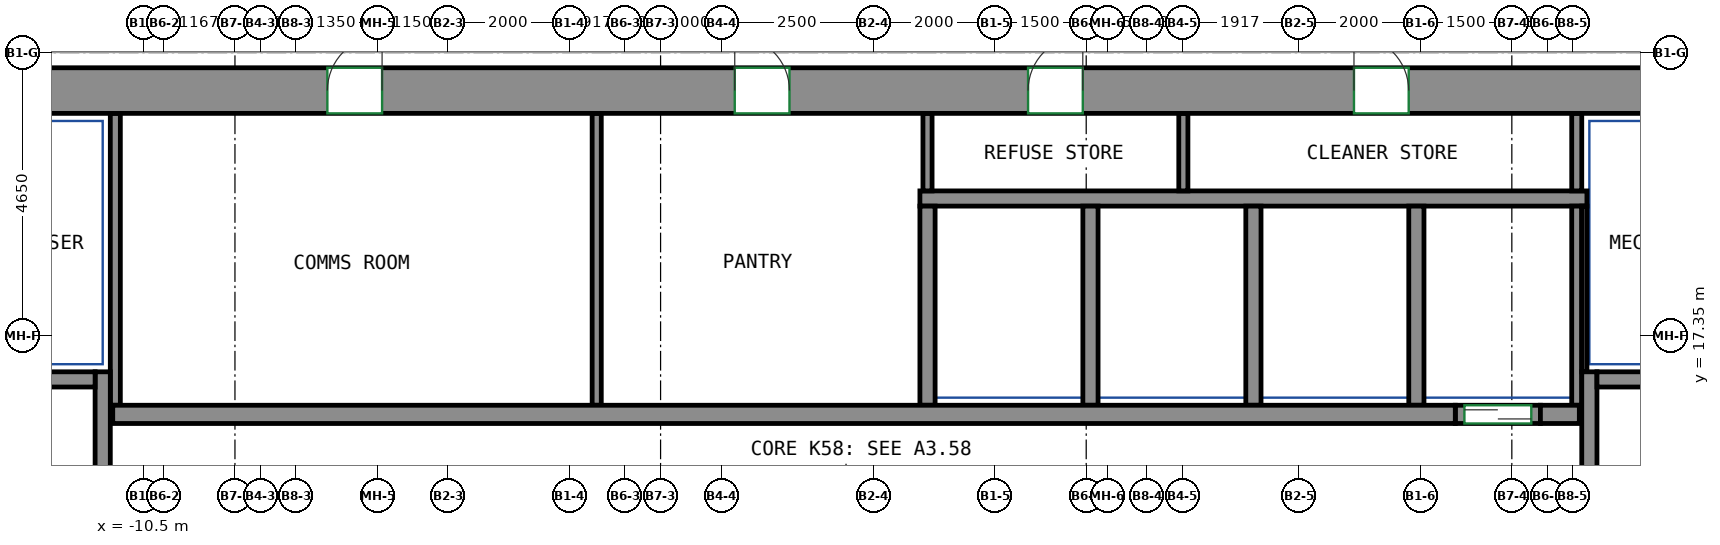
"""IFC4 building model, lengths in metres.
Left out: names, types, materials, properties, quantities, classifications, styles, units other than length and angle.
Written with IfcOpenShell. Run it as: python <this file> out.ifc"""

import sys

from ifc_helpers import new_model, si_unit, direction, frame, frame_2d, origin, place, context, subcontext, project, spatial, rectangle, extrude, source, transform, mapped, element, fill, save


model = new_model("IFC4")
c1 = context("Model", 3, precision=1e-05, world=origin(), true_north=direction((0.0, 1.0)))
c2 = subcontext(c1, "Body", "Model", "MODEL_VIEW")
j1 = project(units=[si_unit("LENGTHUNIT", "METRE"), si_unit("PLANEANGLEUNIT", "RADIAN")], contexts=[c1])
p1 = place(None, origin())
s1 = spatial("IfcSite", under=j1, at=p1, CompositionType="ELEMENT")
p2 = place(p1, origin())
s2 = spatial("IfcBuilding", under=s1, at=p2, CompositionType="ELEMENT")
p3 = place(p2, frame((0.0, 0.0, 239.0)))
s3 = spatial("IfcBuildingStorey", under=s2, at=p3, CompositionType="ELEMENT", Elevation=239.0)
m1 = source(origin(), c2, "Body", "SweptSolid", [
    extrude(rectangle(XDim=33.6, YDim=0.75, at=frame_2d((16.8, 0.0))), origin(), (0.0, 0.0, 1.0), 3.12),
])
p4 = place(p3, frame((-15.75, 21.375, 0.0), z_axis=(0.0, 0.0, 1.0), x_axis=(1.0, 0.0, 0.0)))
e1 = element("IfcWall", 1, at=p4, inside=s3, PredefinedType="SHEAR", context=c2, shape_type="MappedRepresentation", body=[
    mapped(m1, transform((0.0, 0.0, 0.0))),
])
p5 = place(p4, frame((8.27, 0.0, 0.0)))
e2 = element("IfcOpeningElement", 2, at=p5, cuts=e1, PredefinedType="OPENING", context=c2, shape_type="SweptSolid", body=[
    extrude(rectangle(XDim=0.9, YDim=2.1, at=frame_2d((0.45, 1.05))), frame((0.0, 0.385, 0.0), z_axis=(0.0, -1.0, 0.0), x_axis=(1.0, 0.0, 0.0)), (0.0, 0.0, 1.0), 0.77),
])
p6 = place(p4, frame((14.97, 0.0, 0.0)))
e3 = element("IfcOpeningElement", 3, at=p6, cuts=e1, PredefinedType="OPENING", context=c2, shape_type="SweptSolid", body=[
    extrude(rectangle(XDim=0.9, YDim=2.1, at=frame_2d((0.45, 1.05))), frame((0.0, 0.385, 0.0), z_axis=(0.0, -1.0, 0.0), x_axis=(1.0, 0.0, 0.0)), (0.0, 0.0, 1.0), 0.77),
])
p7 = place(p4, frame((19.794, 0.0, 0.0)))
e4 = element("IfcOpeningElement", 4, at=p7, cuts=e1, PredefinedType="OPENING", context=c2, shape_type="SweptSolid", body=[
    extrude(rectangle(XDim=0.9, YDim=2.1, at=frame_2d((0.45, 1.05))), frame((0.0, 0.385, 0.0), z_axis=(0.0, -1.0, 0.0), x_axis=(1.0, 0.0, 0.0)), (0.0, 0.0, 1.0), 0.77),
])
p8 = place(p4, frame((25.154, 0.0, 0.0)))
e5 = element("IfcOpeningElement", 5, at=p8, cuts=e1, PredefinedType="OPENING", context=c2, shape_type="SweptSolid", body=[
    extrude(rectangle(XDim=0.9, YDim=2.1, at=frame_2d((0.45, 1.05))), frame((0.0, 0.385, 0.0), z_axis=(0.0, -1.0, 0.0), x_axis=(1.0, 0.0, 0.0)), (0.0, 0.0, 1.0), 0.77),
])
p9 = place(p4, frame((2.275, 0.0, 0.0)))
e6 = element("IfcOpeningElement", 6, at=p9, cuts=e1, PredefinedType="OPENING", context=c2, shape_type="SweptSolid", body=[
    extrude(rectangle(XDim=0.9, YDim=2.1, at=frame_2d((0.45, 1.05))), frame((0.0, 0.385, 0.0), z_axis=(0.0, -1.0, 0.0), x_axis=(1.0, 0.0, 0.0)), (0.0, 0.0, 1.0), 0.77),
])
p10 = place(p4, frame((30.425, 0.0, 0.0)))
e7 = element("IfcOpeningElement", 7, at=p10, cuts=e1, PredefinedType="OPENING", context=c2, shape_type="SweptSolid", body=[
    extrude(rectangle(XDim=0.9, YDim=2.1, at=frame_2d((0.45, 1.05))), frame((0.0, 0.385, 0.0), z_axis=(0.0, -1.0, 0.0), x_axis=(1.0, 0.0, 0.0)), (0.0, 0.0, 1.0), 0.77),
])
m2 = source(origin(), c2, "Body", "SweptSolid", [
    extrude(rectangle(XDim=7.75, YDim=0.25, at=frame_2d((3.875, 0.0))), origin(), (0.0, 0.0, 1.0), 3.12),
])
p11 = place(p3, frame((-11.175, 9.0, 0.0), z_axis=(0.0, 0.0, 1.0), x_axis=(0.0, 1.0, 0.0)))
e8 = element("IfcWall", 8, at=p11, inside=s3, PredefinedType="SHEAR", context=c2, shape_type="MappedRepresentation", body=[
    mapped(m2, transform((0.0, 0.0, 0.0))),
])
m3 = source(origin(), c2, "Body", "SweptSolid", [
    extrude(rectangle(XDim=3.7, YDim=0.25, at=frame_2d((1.85, 0.0))), origin(), (0.0, 0.0, 1.0), 3.12),
])
p12 = place(p3, frame((-15.0, 16.625, 0.0), z_axis=(0.0, 0.0, 1.0), x_axis=(1.0, 0.0, 0.0)))
e9 = element("IfcWall", 9, at=p12, inside=s3, PredefinedType="SHEAR", context=c2, shape_type="MappedRepresentation", body=[
    mapped(m3, transform((0.0, 0.0, 0.0))),
])
p13 = place(p3, frame((13.275, 9.0, 0.0), z_axis=(0.0, 0.0, 1.0), x_axis=(0.0, 1.0, 0.0)))
e10 = element("IfcWall", 10, at=p13, inside=s3, PredefinedType="SHEAR", context=c2, shape_type="MappedRepresentation", body=[
    mapped(m2, transform((0.0, 0.0, 0.0))),
])
m4 = source(origin(), c2, "Body", "SweptSolid", [
    extrude(rectangle(XDim=3.7, YDim=0.25, at=frame_2d((1.85, 0.0))), origin(), (0.0, 0.0, 1.0), 3.12),
])
p14 = place(p3, frame((13.4, 16.625, 0.0), z_axis=(0.0, 0.0, 1.0), x_axis=(1.0, 0.0, 0.0)))
e11 = element("IfcWall", 11, at=p14, inside=s3, PredefinedType="SHEAR", context=c2, shape_type="MappedRepresentation", body=[
    mapped(m4, transform((0.0, 0.0, 0.0))),
])
m5 = source(origin(), c2, "Body", "SweptSolid", [
    extrude(rectangle(XDim=22.08, YDim=0.3, at=frame_2d((11.04, 0.0))), origin(), (0.0, 0.0, 1.0), 3.12),
])
p15 = place(p3, frame((-11.01, 16.05, 0.0), z_axis=(0.0, 0.0, 1.0), x_axis=(1.0, 0.0, 0.0)))
e12 = element("IfcWall", 12, at=p15, inside=s3, PredefinedType="SHEAR", context=c2, shape_type="MappedRepresentation", body=[
    mapped(m5, transform((0.0, 0.0, 0.0))),
])
m6 = source(origin(), c2, "Body", "SweptSolid", [
    extrude(rectangle(XDim=0.64, YDim=0.3, at=frame_2d((0.32, 0.0))), origin(), (0.0, 0.0, 1.0), 3.12),
])
p16 = place(p3, frame((12.47, 16.05, 0.0), z_axis=(0.0, 0.0, 1.0), x_axis=(1.0, 0.0, 0.0)))
e13 = element("IfcWall", 13, at=p16, inside=s3, PredefinedType="SHEAR", context=c2, shape_type="MappedRepresentation", body=[
    mapped(m6, transform((0.0, 0.0, 0.0))),
])
m7 = source(origin(), c2, "Body", "SweptSolid", [
    extrude(rectangle(XDim=1.4, YDim=0.3, at=frame_2d((0.7, 0.0))), origin(), (0.0, 0.0, 1.0), 3.12),
])
p17 = place(p3, frame((11.07, 16.05, 0.0), z_axis=(0.0, 0.0, 1.0), x_axis=(1.0, 0.0, 0.0)))
e14 = element("IfcWall", 14, at=p17, inside=s3, PredefinedType="PARTITIONING", context=c2, shape_type="MappedRepresentation", body=[
    mapped(m7, transform((0.0, 0.0, 0.0))),
])
p18 = place(p17, frame((0.15, 0.0, 0.0)))
e15 = element("IfcOpeningElement", 15, at=p18, cuts=e14, PredefinedType="OPENING", context=c2, shape_type="SweptSolid", body=[
    extrude(rectangle(XDim=1.1, YDim=2.1, at=frame_2d((0.55, 1.05))), frame((0.0, 0.16, 0.0), z_axis=(0.0, -1.0, 0.0), x_axis=(1.0, 0.0, 0.0)), (0.0, 0.0, 1.0), 0.32),
])
m8 = source(origin(), c2, "Body", "SweptSolid", [
    extrude(rectangle(XDim=10.97, YDim=0.25, at=frame_2d((5.485, 0.0))), origin(), (0.0, 0.0, 1.0), 3.12),
])
p19 = place(p3, frame((2.265, 19.6, 0.0), z_axis=(0.0, 0.0, 1.0), x_axis=(1.0, 0.0, 0.0)))
e16 = element("IfcWall", 16, at=p19, inside=s3, PredefinedType="PARTITIONING", context=c2, shape_type="MappedRepresentation", body=[
    mapped(m8, transform((0.0, 0.0, 0.0))),
])
m9 = source(origin(), c2, "Body", "SweptSolid", [
    extrude(rectangle(XDim=3.275, YDim=0.165, at=frame_2d((1.638, 0.0))), origin(), (0.0, 0.0, 1.0), 3.12),
])
p20 = place(p3, frame((13.067, 16.2, 0.0), z_axis=(0.0, 0.0, 1.0), x_axis=(0.0, 1.0, 0.0)))
e17 = element("IfcWall", 17, at=p20, inside=s3, PredefinedType="PARTITIONING", context=c2, shape_type="MappedRepresentation", body=[
    mapped(m9, transform((0.0, 0.0, 0.0))),
])
m10 = source(origin(), c2, "Body", "SweptSolid", [
    extrude(rectangle(XDim=1.275, YDim=0.165, at=frame_2d((0.637, 0.0))), origin(), (0.0, 0.0, 1.0), 3.12),
])
p21 = place(p3, frame((13.067, 19.725, 0.0), z_axis=(0.0, 0.0, 1.0), x_axis=(0.0, 1.0, 0.0)))
e18 = element("IfcWall", 18, at=p21, inside=s3, PredefinedType="PARTITIONING", context=c2, shape_type="MappedRepresentation", body=[
    mapped(m10, transform((0.0, 0.0, 0.0))),
])
m11 = source(origin(), c2, "Body", "SweptSolid", [
    extrude(rectangle(XDim=4.8, YDim=0.165, at=frame_2d((2.4, 0.0))), origin(), (0.0, 0.0, 1.0), 3.12),
])
p22 = place(p3, frame((-10.968, 16.2, 0.0), z_axis=(0.0, 0.0, 1.0), x_axis=(0.0, 1.0, 0.0)))
e19 = element("IfcWall", 19, at=p22, inside=s3, PredefinedType="PARTITIONING", context=c2, shape_type="MappedRepresentation", body=[
    mapped(m11, transform((0.0, 0.0, 0.0))),
])
m12 = source(origin(), c2, "Body", "SweptSolid", [
    extrude(rectangle(XDim=3.275, YDim=0.25, at=frame_2d((1.638, 0.0))), origin(), (0.0, 0.0, 1.0), 3.12),
])
p23 = place(p3, frame((10.43, 16.2, 0.0), z_axis=(0.0, 0.0, 1.0), x_axis=(0.0, 1.0, 0.0)))
e20 = element("IfcWall", 20, at=p23, inside=s3, PredefinedType="PARTITIONING", context=c2, shape_type="MappedRepresentation", body=[
    mapped(m12, transform((0.0, 0.0, 0.0))),
])
m13 = source(origin(), c2, "Body", "SweptSolid", [
    extrude(rectangle(XDim=2.725, YDim=0.085, at=frame_2d((1.363, 0.0))), origin(), (0.0, 0.0, 1.0), 3.12),
])
p24 = place(p3, frame((13.192, 16.75, 0.0), z_axis=(0.0, 0.0, 1.0), x_axis=(0.0, 1.0, 0.0)))
e21 = element("IfcWall", 21, at=p24, inside=s3, PredefinedType="PARTITIONING", context=c2, shape_type="MappedRepresentation", body=[
    mapped(m13, transform((0.0, 0.0, 0.0))),
])
for number, where, z_axis, x_axis in (
    (22, (2.39, 16.2, 0.0), (0.0, 0.0, 1.0), (0.0, 1.0, 0.0)),
    (23, (5.07, 16.2, 0.0), (0.0, 0.0, 1.0), (0.0, 1.0, 0.0)),
    (24, (7.75, 16.2, 0.0), (0.0, 0.0, 1.0), (0.0, 1.0, 0.0)),
):
    element("IfcWall", number, at=place(p3, frame(where, z_axis=z_axis, x_axis=x_axis)), inside=s3, PredefinedType="PARTITIONING", context=c2, shape_type="MappedRepresentation", body=[
        mapped(m12, transform((0.0, 0.0, 0.0))),
    ])
m14 = source(origin(), c2, "Body", "SweptSolid", [
    extrude(rectangle(XDim=4.8, YDim=0.15, at=frame_2d((2.4, 0.0))), origin(), (0.0, 0.0, 1.0), 3.12),
])
p25 = place(p3, frame((-3.05, 16.2, 0.0), z_axis=(0.0, 0.0, 1.0), x_axis=(0.0, 1.0, 0.0)))
e25 = element("IfcWall", 25, at=p25, inside=s3, PredefinedType="PARTITIONING", context=c2, shape_type="MappedRepresentation", body=[
    mapped(m14, transform((0.0, 0.0, 0.0))),
])
m15 = source(origin(), c2, "Body", "SweptSolid", [
    extrude(rectangle(XDim=1.275, YDim=0.15, at=frame_2d((0.637, 0.0))), origin(), (0.0, 0.0, 1.0), 3.12),
])
for number, where, z_axis, x_axis in (
    (26, (2.39, 19.725, 0.0), (0.0, 0.0, 1.0), (0.0, 1.0, 0.0)),
    (27, (6.598, 19.725, 0.0), (0.0, 0.0, 1.0), (0.0, 1.0, 0.0)),
):
    element("IfcWall", number, at=place(p3, frame(where, z_axis=z_axis, x_axis=x_axis)), inside=s3, PredefinedType="PARTITIONING", context=c2, shape_type="MappedRepresentation", body=[
        mapped(m15, transform((0.0, 0.0, 0.0))),
    ])
p26 = place(p18, origin())
e28 = element("IfcDoor", 28, at=p26, inside=s3, OperationType="DOUBLE_DOOR_SLIDING", PredefinedType="DOOR", context=c2, shape_type="SweptSolid", body=[
    extrude(rectangle(XDim=1.1, YDim=2.1, at=frame_2d((0.55, 1.05))), frame((0.0, 0.025, 0.0), z_axis=(0.0, -1.0, 0.0), x_axis=(1.0, 0.0, 0.0)), (0.0, 0.0, 1.0), 0.05),
])
fill(e15, e28)
p27 = place(p5, origin())
e29 = element("IfcDoor", 29, at=p27, inside=s3, OperationType="SINGLE_SWING_RIGHT", PredefinedType="DOOR", context=c2, shape_type="SweptSolid", body=[
    extrude(rectangle(XDim=0.9, YDim=2.1, at=frame_2d((0.45, 1.05))), frame((0.0, -0.23, 0.0), z_axis=(0.0, -1.0, 0.0), x_axis=(1.0, 0.0, 0.0)), (0.0, 0.0, 1.0), 0.05),
])
fill(e2, e29)
p28 = place(p6, origin())
e30 = element("IfcDoor", 30, at=p28, inside=s3, OperationType="SINGLE_SWING_LEFT", PredefinedType="DOOR", context=c2, shape_type="SweptSolid", body=[
    extrude(rectangle(XDim=0.9, YDim=2.1, at=frame_2d((0.45, 1.05))), frame((0.0, -0.23, 0.0), z_axis=(0.0, -1.0, 0.0), x_axis=(1.0, 0.0, 0.0)), (0.0, 0.0, 1.0), 0.05),
])
fill(e3, e30)
p29 = place(p7, origin())
e31 = element("IfcDoor", 31, at=p29, inside=s3, OperationType="SINGLE_SWING_RIGHT", PredefinedType="DOOR", context=c2, shape_type="SweptSolid", body=[
    extrude(rectangle(XDim=0.9, YDim=2.1, at=frame_2d((0.45, 1.05))), frame((0.0, -0.23, 0.0), z_axis=(0.0, -1.0, 0.0), x_axis=(1.0, 0.0, 0.0)), (0.0, 0.0, 1.0), 0.05),
])
fill(e4, e31)
p30 = place(p8, origin())
e32 = element("IfcDoor", 32, at=p30, inside=s3, OperationType="SINGLE_SWING_LEFT", PredefinedType="DOOR", context=c2, shape_type="SweptSolid", body=[
    extrude(rectangle(XDim=0.9, YDim=2.1, at=frame_2d((0.45, 1.05))), frame((0.0, -0.23, 0.0), z_axis=(0.0, -1.0, 0.0), x_axis=(1.0, 0.0, 0.0)), (0.0, 0.0, 1.0), 0.05),
])
fill(e5, e32)
save(model, sys.argv[1])
